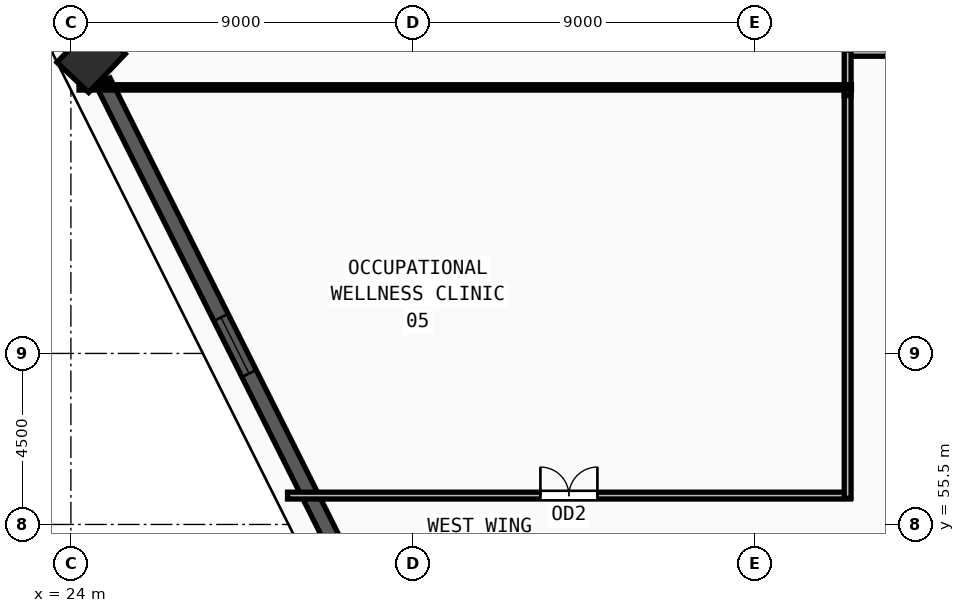
"""IFC4 building model, lengths in metres.
Left out: names, types, materials, properties, quantities, classifications, styles, units other than length and angle.
Written with IfcOpenShell. Run it as: python <this file> out.ifc"""

import sys

from ifc_helpers import new_model, si_unit, direction, frame, frame_2d, origin, origin_2d, place, context, subcontext, project, spatial, rectangle, extrude, source, transform, mapped, element, fill, save


model = new_model("IFC4")
c1 = context("Model", 3, precision=1e-05, world=origin(), true_north=direction((0.0, 1.0)))
c2 = subcontext(c1, "Body", "Model", "MODEL_VIEW")
j1 = project(units=[si_unit("LENGTHUNIT", "METRE"), si_unit("PLANEANGLEUNIT", "RADIAN")], contexts=[c1])
p1 = place(None, origin())
s1 = spatial("IfcSite", under=j1, at=p1, CompositionType="ELEMENT")
p2 = place(p1, origin())
s2 = spatial("IfcBuilding", under=s1, at=p2, CompositionType="ELEMENT")
p3 = place(p2, frame((0.0, 0.0, 144.0)))
s3 = spatial("IfcBuildingStorey", under=s2, at=p3, CompositionType="ELEMENT", Elevation=144.0)
m1 = source(origin(), c2, "Body", "SweptSolid", [
    extrude(rectangle(XDim=1.4, YDim=1.15, at=origin_2d()), origin(), (0.0, 0.0, 1.0), 3.75),
])
p4 = place(p3, frame((24.533, 67.77, 0.0), z_axis=(0.0, 0.0, 1.0), x_axis=(0.689240273721, 0.724532846102, 0.0)))
e1 = element("IfcColumn", 1, at=p4, inside=s3, PredefinedType="COLUMN", context=c2, shape_type="MappedRepresentation", body=[
    mapped(m1, transform((0.0, 0.0, 0.0), x_axis=(1.0, 0.0, 0.0), y_axis=(0.0, 1.0, 0.0), z_axis=(0.0, 0.0, 1.0), scale=1.0)),
])
p5 = place(p3, frame((24.842, 67.153, 0.0), z_axis=(0.0, 0.0, 1.0), x_axis=(0.447741761442, -0.894162913043, 0.0)))
e2 = element("IfcWall", 2, at=p5, inside=s3, PredefinedType="SOLIDWALL", context=c2, shape_type="SweptSolid", body=[
    extrude(rectangle(XDim=31.058, YDim=0.42, at=frame_2d((15.529, 0.0))), origin(), (0.0, 0.0, 1.0), 3.57),
])
m2 = source(origin(), c2, "Body", "SweptSolid", [
    extrude(rectangle(XDim=1.65, YDim=1.95, at=frame_2d((0.825, 0.975))), frame((0.0, 0.22, 0.0), z_axis=(0.0, -1.0, 0.0), x_axis=(1.0, 0.0, 0.0)), (0.0, 0.0, 1.0), 0.44),
])
p6 = place(p5, frame((6.94, 0.0, 0.55)))
e3 = element("IfcOpeningElement", 3, at=p6, cuts=e2, PredefinedType="OPENING", context=c2, shape_type="MappedRepresentation", body=[
    mapped(m2, transform((0.0, 0.0, 0.0), x_axis=(1.0, 0.0, 0.0), y_axis=(0.0, 1.0, 0.0), z_axis=(0.0, 0.0, 1.0), scale=1.0)),
])
p7 = place(p5, frame((16.254, 0.0, 0.55)))
e4 = element("IfcOpeningElement", 4, at=p7, cuts=e2, PredefinedType="OPENING", context=c2, shape_type="MappedRepresentation", body=[
    mapped(m2, transform((0.0, 0.0, 0.0), x_axis=(1.0, 0.0, 0.0), y_axis=(0.0, 1.0, 0.0), z_axis=(0.0, 0.0, 1.0), scale=1.0)),
])
p8 = place(p5, frame((22.469, 0.0, 0.55)))
e5 = element("IfcOpeningElement", 5, at=p8, cuts=e2, PredefinedType="OPENING", context=c2, shape_type="MappedRepresentation", body=[
    mapped(m2, transform((0.0, 0.0, 0.0), x_axis=(1.0, 0.0, 0.0), y_axis=(0.0, 1.0, 0.0), z_axis=(0.0, 0.0, 1.0), scale=1.0)),
])
p9 = place(p3, frame((44.37, 67.91, 0.0), z_axis=(0.0, 0.0, 1.0), x_axis=(1.0, 0.0, 0.0)))
e6 = element("IfcWall", 6, at=p9, inside=s3, PredefinedType="PARTITIONING", context=c2, shape_type="SweptSolid", body=[
    extrude(rectangle(XDim=9.415, YDim=0.18, at=frame_2d((4.708, 0.0))), origin(), (0.0, 0.0, 1.0), 3.57),
])
m3 = source(origin(), c2, "Body", "SweptSolid", [
    extrude(rectangle(XDim=1.5, YDim=2.2, at=frame_2d((0.75, 1.1))), frame((0.0, 0.1, 0.0), z_axis=(0.0, -1.0, 0.0), x_axis=(1.0, 0.0, 0.0)), (0.0, 0.0, 1.0), 0.2),
])
p10 = place(p9, frame((3.957, 0.0, 0.0)))
e7 = element("IfcOpeningElement", 7, at=p10, cuts=e6, PredefinedType="OPENING", context=c2, shape_type="MappedRepresentation", body=[
    mapped(m3, transform((0.0, 0.0, 0.0), x_axis=(1.0, 0.0, 0.0), y_axis=(0.0, 1.0, 0.0), z_axis=(0.0, 0.0, 1.0), scale=1.0)),
])
p11 = place(p3, frame((29.701, 56.26, 0.0), z_axis=(0.0, 0.0, 1.0), x_axis=(1.0, 0.0, 0.0)))
e8 = element("IfcWall", 8, at=p11, inside=s3, PredefinedType="PARTITIONING", context=c2, shape_type="SweptSolid", body=[
    extrude(rectangle(XDim=14.809, YDim=0.18, at=frame_2d((7.405, 0.0))), origin(), (0.0, 0.0, 1.0), 3.57),
])
p12 = place(p11, frame((6.654, 0.0, 0.0)))
e9 = element("IfcOpeningElement", 9, at=p12, cuts=e8, PredefinedType="OPENING", context=c2, shape_type="MappedRepresentation", body=[
    mapped(m3, transform((0.0, 0.0, 0.0), x_axis=(1.0, 0.0, 0.0), y_axis=(0.0, 1.0, 0.0), z_axis=(0.0, 0.0, 1.0), scale=1.0)),
])
p13 = place(p3, frame((44.44, 66.785, 0.0), z_axis=(0.0, 0.0, 1.0), x_axis=(0.0, 1.0, 0.0)))
e10 = element("IfcWall", 10, at=p13, inside=s3, PredefinedType="PARTITIONING", context=c2, shape_type="SweptSolid", body=[
    extrude(rectangle(XDim=1.195, YDim=0.18, at=frame_2d((0.598, 0.0))), origin(), (0.0, 0.0, 1.0), 3.57),
])
p14 = place(p3, frame((44.44, 56.19, 0.0), z_axis=(0.0, 0.0, 1.0), x_axis=(0.0, 1.0, 0.0)))
e11 = element("IfcWall", 11, at=p14, inside=s3, PredefinedType="PARTITIONING", context=c2, shape_type="SweptSolid", body=[
    extrude(rectangle(XDim=10.595, YDim=0.18, at=frame_2d((5.297, 0.0))), origin(), (0.0, 0.0, 1.0), 3.57),
])
p15 = place(p3, frame((44.54, 67.0, 0.0), z_axis=(0.0, 0.0, 1.0), x_axis=(-1.0, 0.0, 0.0)))
e12 = element("IfcWall", 12, at=p15, inside=s3, PredefinedType="PARTITIONING", context=c2, shape_type="SweptSolid", body=[
    extrude(rectangle(XDim=20.326, YDim=0.14, at=frame_2d((10.163, 0.0))), origin(), (0.0, 0.0, 1.0), 2.755),
])
m4 = source(origin(), c2, "Body", "SweptSolid", [
    extrude(rectangle(XDim=1.65, YDim=1.95, at=frame_2d((0.825, 0.975))), frame((0.0, 0.03, 0.0), z_axis=(0.0, -1.0, 0.0), x_axis=(1.0, 0.0, 0.0)), (0.0, 0.0, 1.0), 0.06),
])
p16 = place(p6, origin())
e13 = element("IfcWindow", 13, at=p16, inside=s3, PartitioningType="DOUBLE_PANEL_VERTICAL", PredefinedType="WINDOW", context=c2, shape_type="MappedRepresentation", body=[
    mapped(m4, transform((0.0, 0.0, 0.0), x_axis=(1.0, 0.0, 0.0), y_axis=(0.0, 1.0, 0.0), z_axis=(0.0, 0.0, 1.0), scale=1.0)),
])
fill(e3, e13)
m5 = source(origin(), c2, "Body", "SweptSolid", [
    extrude(rectangle(XDim=1.5, YDim=2.2, at=frame_2d((0.75, 1.1))), frame((0.0, 0.025, 0.0), z_axis=(0.0, -1.0, 0.0), x_axis=(1.0, 0.0, 0.0)), (0.0, 0.0, 1.0), 0.05),
])
p17 = place(p12, origin())
e14 = element("IfcDoor", 14, at=p17, inside=s3, OperationType="DOUBLE_DOOR_SINGLE_SWING", PredefinedType="DOOR", context=c2, shape_type="MappedRepresentation", body=[
    mapped(m5, transform((0.0, 0.0, 0.0), x_axis=(1.0, 0.0, 0.0), y_axis=(0.0, 1.0, 0.0), z_axis=(0.0, 0.0, 1.0), scale=1.0)),
])
fill(e9, e14)
save(model, sys.argv[1])
